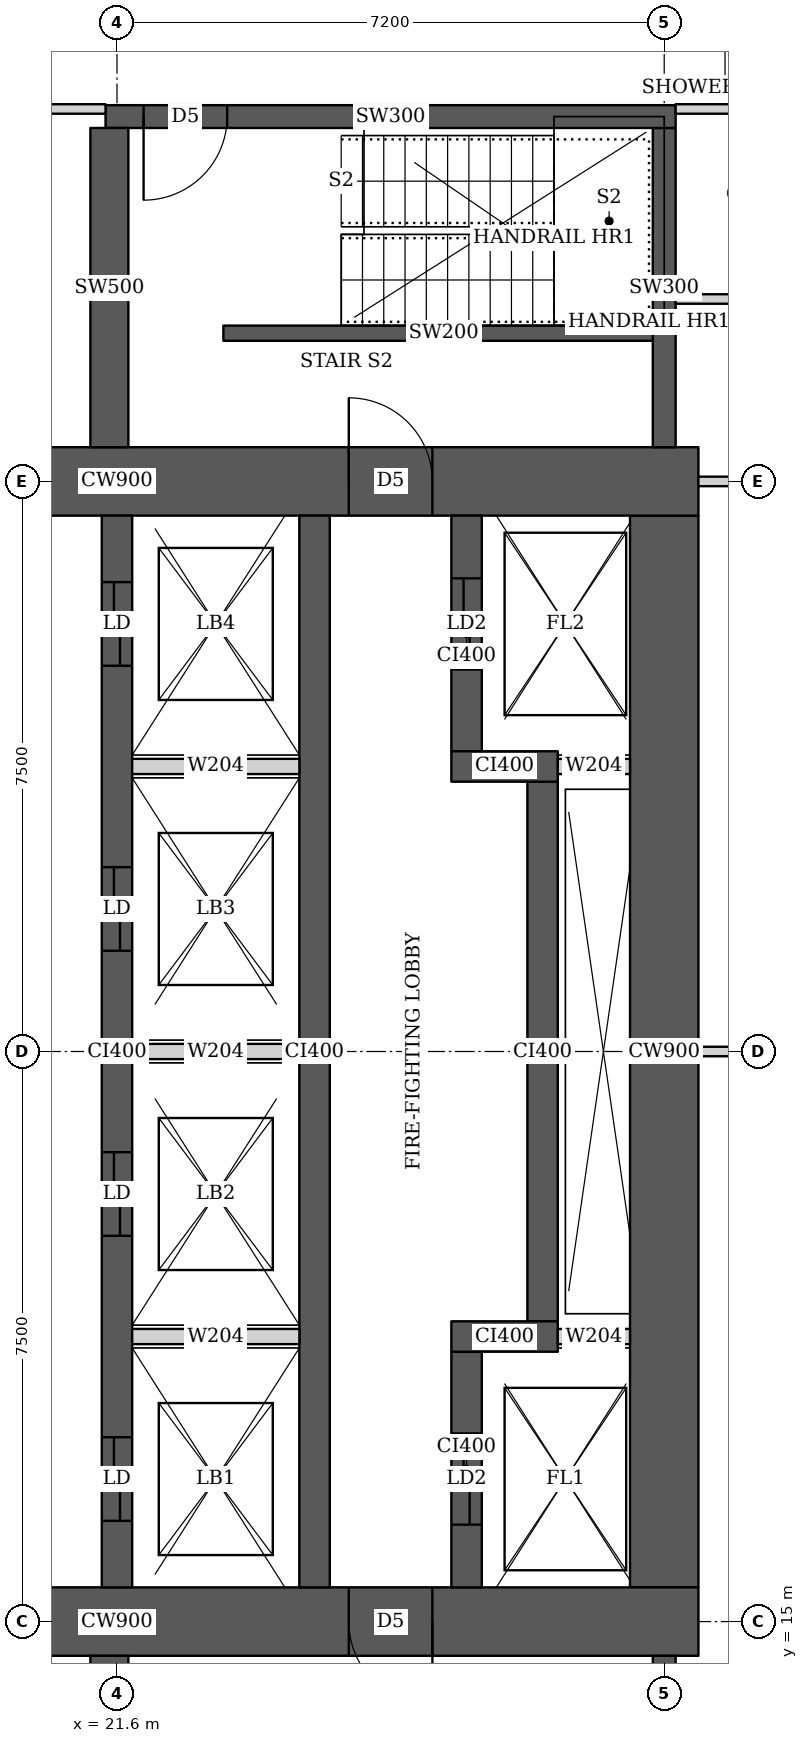
"""IFC4 building model, lengths in metres.
Left out: names, types, materials, properties, quantities, classifications, styles, units other than length and angle.
Written with IfcOpenShell. Run it as: python <this file> out.ifc"""

import sys

from ifc_helpers import new_model, si_unit, direction, frame, frame_2d, origin, place, context, subcontext, project, spatial, rectangle, extrude, element, fill, save


model = new_model("IFC4")
c1 = context("Model", 3, precision=1e-05, world=origin(), true_north=direction((0.0, 1.0)))
c2 = subcontext(c1, "Body", "Model", "MODEL_VIEW")
j1 = project(units=[si_unit("LENGTHUNIT", "METRE"), si_unit("PLANEANGLEUNIT", "RADIAN")], contexts=[c1])
p1 = place(None, origin())
s1 = spatial("IfcSite", under=j1, at=p1, CompositionType="ELEMENT")
p2 = place(p1, origin())
s2 = spatial("IfcBuilding", under=s1, at=p2, CompositionType="ELEMENT")
p3 = place(p2, frame((0.0, 0.0, 234.95)))
s3 = spatial("IfcBuildingStorey", under=s2, at=p3, CompositionType="ELEMENT", Elevation=234.95)
p4 = place(p3, frame((13.95, 15.0, 0.0), z_axis=(0.0, 0.0, 1.0), x_axis=(1.0, 0.0, 0.0)))
e1 = element("IfcWall", 1, at=p4, inside=s3, PredefinedType="SHEAR", context=c2, shape_type="SweptSolid", body=[
    extrude(rectangle(XDim=15.3, YDim=0.9, at=frame_2d((7.65, 0.0))), origin(), (0.0, 0.0, 1.0), 3.75),
])
p5 = place(p4, frame((4.45, 0.0, 0.0)))
e2 = element("IfcOpeningElement", 2, at=p5, cuts=e1, PredefinedType="OPENING", context=c2, shape_type="SweptSolid", body=[
    extrude(rectangle(XDim=1.8, YDim=2.1, at=frame_2d((0.9, 1.05))), frame((0.0, 0.46, 0.0), z_axis=(0.0, -1.0, 0.0), x_axis=(1.0, 0.0, 0.0)), (0.0, 0.0, 1.0), 0.92),
])
p6 = place(p4, frame((10.7, 0.0, 0.0)))
e3 = element("IfcOpeningElement", 3, at=p6, cuts=e1, PredefinedType="OPENING", context=c2, shape_type="SweptSolid", body=[
    extrude(rectangle(XDim=1.1, YDim=2.1, at=frame_2d((0.55, 1.05))), frame((0.0, 0.46, 0.0), z_axis=(0.0, -1.0, 0.0), x_axis=(1.0, 0.0, 0.0)), (0.0, 0.0, 1.0), 0.92),
])
p7 = place(p3, frame((13.95, 30.0, 0.0), z_axis=(0.0, 0.0, 1.0), x_axis=(1.0, 0.0, 0.0)))
e4 = element("IfcWall", 4, at=p7, inside=s3, PredefinedType="SHEAR", context=c2, shape_type="SweptSolid", body=[
    extrude(rectangle(XDim=15.3, YDim=0.9, at=frame_2d((7.65, 0.0))), origin(), (0.0, 0.0, 1.0), 3.75),
])
p8 = place(p7, frame((4.45, 0.0, 0.0)))
e5 = element("IfcOpeningElement", 5, at=p8, cuts=e4, PredefinedType="OPENING", context=c2, shape_type="SweptSolid", body=[
    extrude(rectangle(XDim=1.8, YDim=2.1, at=frame_2d((0.9, 1.05))), frame((0.0, 0.46, 0.0), z_axis=(0.0, -1.0, 0.0), x_axis=(1.0, 0.0, 0.0)), (0.0, 0.0, 1.0), 0.92),
])
p9 = place(p7, frame((10.7, 0.0, 0.0)))
e6 = element("IfcOpeningElement", 6, at=p9, cuts=e4, PredefinedType="OPENING", context=c2, shape_type="SweptSolid", body=[
    extrude(rectangle(XDim=1.1, YDim=2.1, at=frame_2d((0.55, 1.05))), frame((0.0, 0.46, 0.0), z_axis=(0.0, -1.0, 0.0), x_axis=(1.0, 0.0, 0.0)), (0.0, 0.0, 1.0), 0.92),
])
p10 = place(p3, frame((28.8, 15.45, 0.0), z_axis=(0.0, 0.0, 1.0), x_axis=(0.0, 1.0, 0.0)))
e7 = element("IfcWall", 7, at=p10, inside=s3, PredefinedType="SHEAR", context=c2, shape_type="SweptSolid", body=[
    extrude(rectangle(XDim=14.1, YDim=0.9, at=frame_2d((7.05, 0.0))), origin(), (0.0, 0.0, 1.0), 3.75),
])
p11 = place(p3, frame((21.6, 15.45, 0.0), z_axis=(0.0, 0.0, 1.0), x_axis=(0.0, 1.0, 0.0)))
e8 = element("IfcWall", 8, at=p11, inside=s3, PredefinedType="SHEAR", context=c2, shape_type="SweptSolid", body=[
    extrude(rectangle(XDim=14.1, YDim=0.4, at=frame_2d((7.05, 0.0))), origin(), (0.0, 0.0, 1.0), 3.75),
])
p12 = place(p11, frame((0.875, 0.0, 0.0)))
e9 = element("IfcOpeningElement", 9, at=p12, cuts=e8, PredefinedType="OPENING", context=c2, shape_type="SweptSolid", body=[
    extrude(rectangle(XDim=1.1, YDim=2.1, at=frame_2d((0.55, 1.05))), frame((0.0, 0.21, 0.0), z_axis=(0.0, -1.0, 0.0), x_axis=(1.0, 0.0, 0.0)), (0.0, 0.0, 1.0), 0.42),
])
p13 = place(p11, frame((4.625, 0.0, 0.0)))
e10 = element("IfcOpeningElement", 10, at=p13, cuts=e8, PredefinedType="OPENING", context=c2, shape_type="SweptSolid", body=[
    extrude(rectangle(XDim=1.1, YDim=2.1, at=frame_2d((0.55, 1.05))), frame((0.0, 0.21, 0.0), z_axis=(0.0, -1.0, 0.0), x_axis=(1.0, 0.0, 0.0)), (0.0, 0.0, 1.0), 0.42),
])
p14 = place(p11, frame((8.375, 0.0, 0.0)))
e11 = element("IfcOpeningElement", 11, at=p14, cuts=e8, PredefinedType="OPENING", context=c2, shape_type="SweptSolid", body=[
    extrude(rectangle(XDim=1.1, YDim=2.1, at=frame_2d((0.55, 1.05))), frame((0.0, 0.21, 0.0), z_axis=(0.0, -1.0, 0.0), x_axis=(1.0, 0.0, 0.0)), (0.0, 0.0, 1.0), 0.42),
])
p15 = place(p11, frame((12.125, 0.0, 0.0)))
e12 = element("IfcOpeningElement", 12, at=p15, cuts=e8, PredefinedType="OPENING", context=c2, shape_type="SweptSolid", body=[
    extrude(rectangle(XDim=1.1, YDim=2.1, at=frame_2d((0.55, 1.05))), frame((0.0, 0.21, 0.0), z_axis=(0.0, -1.0, 0.0), x_axis=(1.0, 0.0, 0.0)), (0.0, 0.0, 1.0), 0.42),
])
p16 = place(p3, frame((24.2, 15.45, 0.0), z_axis=(0.0, 0.0, 1.0), x_axis=(0.0, 1.0, 0.0)))
e13 = element("IfcWall", 13, at=p16, inside=s3, PredefinedType="SHEAR", context=c2, shape_type="SweptSolid", body=[
    extrude(rectangle(XDim=14.1, YDim=0.4, at=frame_2d((7.05, 0.0))), origin(), (0.0, 0.0, 1.0), 3.75),
])
p17 = place(p3, frame((26.2, 15.45, 0.0), z_axis=(0.0, 0.0, 1.0), x_axis=(0.0, 1.0, 0.0)))
e14 = element("IfcWall", 14, at=p17, inside=s3, PredefinedType="SHEAR", context=c2, shape_type="SweptSolid", body=[
    extrude(rectangle(XDim=3.1, YDim=0.4, at=frame_2d((1.55, 0.0))), origin(), (0.0, 0.0, 1.0), 3.75),
])
p18 = place(p17, frame((0.825, 0.0, 0.0)))
e15 = element("IfcOpeningElement", 15, at=p18, cuts=e14, PredefinedType="OPENING", context=c2, shape_type="SweptSolid", body=[
    extrude(rectangle(XDim=1.2, YDim=2.1, at=frame_2d((0.6, 1.05))), frame((0.0, 0.21, 0.0), z_axis=(0.0, -1.0, 0.0), x_axis=(1.0, 0.0, 0.0)), (0.0, 0.0, 1.0), 0.42),
])
p19 = place(p3, frame((26.0, 18.75, 0.0), z_axis=(0.0, 0.0, 1.0), x_axis=(1.0, 0.0, 0.0)))
e16 = element("IfcWall", 16, at=p19, inside=s3, PredefinedType="SHEAR", context=c2, shape_type="SweptSolid", body=[
    extrude(rectangle(XDim=1.4, YDim=0.4, at=frame_2d((0.7, 0.0))), origin(), (0.0, 0.0, 1.0), 3.75),
])
p20 = place(p3, frame((27.2, 18.95, 0.0), z_axis=(0.0, 0.0, 1.0), x_axis=(0.0, 1.0, 0.0)))
e17 = element("IfcWall", 17, at=p20, inside=s3, PredefinedType="SHEAR", context=c2, shape_type="SweptSolid", body=[
    extrude(rectangle(XDim=7.1, YDim=0.4, at=frame_2d((3.55, 0.0))), origin(), (0.0, 0.0, 1.0), 3.75),
])
p21 = place(p3, frame((26.0, 26.25, 0.0), z_axis=(0.0, 0.0, 1.0), x_axis=(1.0, 0.0, 0.0)))
e18 = element("IfcWall", 18, at=p21, inside=s3, PredefinedType="SHEAR", context=c2, shape_type="SweptSolid", body=[
    extrude(rectangle(XDim=1.4, YDim=0.4, at=frame_2d((0.7, 0.0))), origin(), (0.0, 0.0, 1.0), 3.75),
])
p22 = place(p3, frame((26.2, 26.45, 0.0), z_axis=(0.0, 0.0, 1.0), x_axis=(0.0, 1.0, 0.0)))
e19 = element("IfcWall", 19, at=p22, inside=s3, PredefinedType="SHEAR", context=c2, shape_type="SweptSolid", body=[
    extrude(rectangle(XDim=3.1, YDim=0.4, at=frame_2d((1.55, 0.0))), origin(), (0.0, 0.0, 1.0), 3.75),
])
p23 = place(p22, frame((1.075, 0.0, 0.0)))
e20 = element("IfcOpeningElement", 20, at=p23, cuts=e19, PredefinedType="OPENING", context=c2, shape_type="SweptSolid", body=[
    extrude(rectangle(XDim=1.2, YDim=2.1, at=frame_2d((0.6, 1.05))), frame((0.0, 0.21, 0.0), z_axis=(0.0, -1.0, 0.0), x_axis=(1.0, 0.0, 0.0)), (0.0, 0.0, 1.0), 0.42),
])
p24 = place(p3, frame((21.5, 10.35, 0.0), z_axis=(0.0, 0.0, 1.0), x_axis=(0.0, 1.0, 0.0)))
e21 = element("IfcWall", 21, at=p24, inside=s3, PredefinedType="SHEAR", context=c2, shape_type="SweptSolid", body=[
    extrude(rectangle(XDim=4.2, YDim=0.5, at=frame_2d((2.1, 0.0))), origin(), (0.0, 0.0, 1.0), 3.75),
])
p25 = place(p3, frame((28.8, 10.35, 0.0), z_axis=(0.0, 0.0, 1.0), x_axis=(0.0, 1.0, 0.0)))
e22 = element("IfcWall", 22, at=p25, inside=s3, PredefinedType="SHEAR", context=c2, shape_type="SweptSolid", body=[
    extrude(rectangle(XDim=4.2, YDim=0.3, at=frame_2d((2.1, 0.0))), origin(), (0.0, 0.0, 1.0), 3.75),
])
p26 = place(p3, frame((21.45, 34.8, 0.0), z_axis=(0.0, 0.0, 1.0), x_axis=(1.0, 0.0, 0.0)))
e23 = element("IfcWall", 23, at=p26, inside=s3, PredefinedType="SHEAR", context=c2, shape_type="SweptSolid", body=[
    extrude(rectangle(XDim=7.5, YDim=0.3, at=frame_2d((3.75, 0.0))), origin(), (0.0, 0.0, 1.0), 3.75),
])
p27 = place(p26, frame((0.5, 0.0, 0.0)))
e24 = element("IfcOpeningElement", 24, at=p27, cuts=e23, PredefinedType="OPENING", context=c2, shape_type="SweptSolid", body=[
    extrude(rectangle(XDim=1.1, YDim=2.1, at=frame_2d((0.55, 1.05))), frame((0.0, 0.16, 0.0), z_axis=(0.0, -1.0, 0.0), x_axis=(1.0, 0.0, 0.0)), (0.0, 0.0, 1.0), 0.32),
])
p28 = place(p3, frame((21.5, 30.45, 0.0), z_axis=(0.0, 0.0, 1.0), x_axis=(0.0, 1.0, 0.0)))
e25 = element("IfcWall", 25, at=p28, inside=s3, PredefinedType="SHEAR", context=c2, shape_type="SweptSolid", body=[
    extrude(rectangle(XDim=4.2, YDim=0.5, at=frame_2d((2.1, 0.0))), origin(), (0.0, 0.0, 1.0), 3.75),
])
p29 = place(p3, frame((28.8, 30.45, 0.0), z_axis=(0.0, 0.0, 1.0), x_axis=(0.0, 1.0, 0.0)))
e26 = element("IfcWall", 26, at=p29, inside=s3, PredefinedType="SHEAR", context=c2, shape_type="SweptSolid", body=[
    extrude(rectangle(XDim=4.2, YDim=0.3, at=frame_2d((2.1, 0.0))), origin(), (0.0, 0.0, 1.0), 3.75),
])
p30 = place(p3, frame((13.75, 34.9, 0.0), z_axis=(0.0, 0.0, 1.0), x_axis=(1.0, 0.0, 0.0)))
e27 = element("IfcWall", 27, at=p30, inside=s3, PredefinedType="PARTITIONING", context=c2, shape_type="SweptSolid", body=[
    extrude(rectangle(XDim=7.7, YDim=0.125, at=frame_2d((3.85, 0.0))), origin(), (0.0, 0.0, 1.0), 3.5),
])
p31 = place(p30, frame((4.15, 0.0, 0.0)))
e28 = element("IfcOpeningElement", 28, at=p31, cuts=e27, PredefinedType="OPENING", context=c2, shape_type="SweptSolid", body=[
    extrude(rectangle(XDim=1.8, YDim=2.1, at=frame_2d((0.9, 1.05))), frame((0.0, 0.073, 0.0), z_axis=(0.0, -1.0, 0.0), x_axis=(1.0, 0.0, 0.0)), (0.0, 0.0, 1.0), 0.145),
])
p32 = place(p3, frame((28.95, 34.9, 0.0), z_axis=(0.0, 0.0, 1.0), x_axis=(1.0, 0.0, 0.0)))
e29 = element("IfcWall", 29, at=p32, inside=s3, PredefinedType="PARTITIONING", context=c2, shape_type="SweptSolid", body=[
    extrude(rectangle(XDim=4.588, YDim=0.125, at=frame_2d((2.294, 0.0))), origin(), (0.0, 0.0, 1.0), 3.5),
])
for number, where, z_axis, x_axis in (
    (30, (29.25, 22.5, 0.0), (0.0, 0.0, 1.0), (1.0, 0.0, 0.0)),
    (31, (29.25, 30.0, 0.0), (0.0, 0.0, 1.0), (1.0, 0.0, 0.0)),
):
    element("IfcWall", number, at=place(p3, frame(where, z_axis=z_axis, x_axis=x_axis)), inside=s3, PredefinedType="PARTITIONING", context=c2, shape_type="SweptSolid", body=[
        extrude(rectangle(XDim=3.049, YDim=0.125, at=frame_2d((1.524, 0.0))), origin(), (0.0, 0.0, 1.0), 3.5),
    ])
p33 = place(p3, frame((28.95, 32.4, 0.0), z_axis=(0.0, 0.0, 1.0), x_axis=(1.0, 0.0, 0.0)))
e32 = element("IfcWall", 32, at=p33, inside=s3, PredefinedType="PARTITIONING", context=c2, shape_type="SweptSolid", body=[
    extrude(rectangle(XDim=4.976, YDim=0.125, at=frame_2d((2.488, 0.0))), origin(), (0.0, 0.0, 1.0), 3.5),
])
p34 = place(p3, frame((23.0, 31.95, 0.0), z_axis=(0.0, 0.0, 1.0), x_axis=(1.0, 0.0, 0.0)))
e33 = element("IfcWall", 33, at=p34, inside=s3, PredefinedType="SHEAR", context=c2, shape_type="SweptSolid", body=[
    extrude(rectangle(XDim=5.8, YDim=0.2, at=frame_2d((2.9, 0.0))), origin(), (0.0, 0.0, 1.0), 3.75),
])
for number, where, z_axis, x_axis in (
    (34, (21.8, 18.75, 0.0), (0.0, 0.0, 1.0), (1.0, 0.0, 0.0)),
    (35, (21.8, 22.5, 0.0), (0.0, 0.0, 1.0), (1.0, 0.0, 0.0)),
    (36, (21.8, 26.25, 0.0), (0.0, 0.0, 1.0), (1.0, 0.0, 0.0)),
):
    element("IfcWall", number, at=place(p3, frame(where, z_axis=z_axis, x_axis=x_axis)), inside=s3, PredefinedType="SOLIDWALL", context=c2, shape_type="SweptSolid", body=[
        extrude(rectangle(XDim=2.2, YDim=0.2, at=frame_2d((1.1, 0.0))), origin(), (0.0, 0.0, 1.0), 3.5),
    ])
for number, where, z_axis, x_axis in (
    (37, (27.4, 18.75, 0.0), (0.0, 0.0, 1.0), (1.0, 0.0, 0.0)),
    (38, (27.4, 26.25, 0.0), (0.0, 0.0, 1.0), (1.0, 0.0, 0.0)),
):
    element("IfcWall", number, at=place(p3, frame(where, z_axis=z_axis, x_axis=x_axis)), inside=s3, PredefinedType="SOLIDWALL", context=c2, shape_type="SweptSolid", body=[
        extrude(rectangle(XDim=0.95, YDim=0.2, at=frame_2d((0.475, 0.0))), origin(), (0.0, 0.0, 1.0), 3.5),
    ])
p35 = place(p6, origin())
e39 = element("IfcDoor", 39, at=p35, inside=s3, OperationType="SINGLE_SWING_LEFT", PredefinedType="DOOR", context=c2, shape_type="SweptSolid", body=[
    extrude(rectangle(XDim=1.1, YDim=2.1, at=frame_2d((0.55, 1.05))), frame((0.0, 0.025, 0.0), z_axis=(0.0, -1.0, 0.0), x_axis=(1.0, 0.0, 0.0)), (0.0, 0.0, 1.0), 0.05),
])
fill(e3, e39)
p36 = place(p9, origin())
e40 = element("IfcDoor", 40, at=p36, inside=s3, OperationType="SINGLE_SWING_LEFT", PredefinedType="DOOR", context=c2, shape_type="SweptSolid", body=[
    extrude(rectangle(XDim=1.1, YDim=2.1, at=frame_2d((0.55, 1.05))), frame((0.0, 0.025, 0.0), z_axis=(0.0, -1.0, 0.0), x_axis=(1.0, 0.0, 0.0)), (0.0, 0.0, 1.0), 0.05),
])
fill(e6, e40)
p37 = place(p18, origin())
e41 = element("IfcDoor", 41, at=p37, inside=s3, OperationType="DOUBLE_DOOR_SLIDING", PredefinedType="DOOR", context=c2, shape_type="SweptSolid", body=[
    extrude(rectangle(XDim=1.2, YDim=2.1, at=frame_2d((0.6, 1.05))), frame((0.0, 0.025, 0.0), z_axis=(0.0, -1.0, 0.0), x_axis=(1.0, 0.0, 0.0)), (0.0, 0.0, 1.0), 0.05),
])
fill(e15, e41)
p38 = place(p23, origin())
e42 = element("IfcDoor", 42, at=p38, inside=s3, OperationType="DOUBLE_DOOR_SLIDING", PredefinedType="DOOR", context=c2, shape_type="SweptSolid", body=[
    extrude(rectangle(XDim=1.2, YDim=2.1, at=frame_2d((0.6, 1.05))), frame((0.0, 0.025, 0.0), z_axis=(0.0, -1.0, 0.0), x_axis=(1.0, 0.0, 0.0)), (0.0, 0.0, 1.0), 0.05),
])
fill(e20, e42)
p39 = place(p12, origin())
e43 = element("IfcDoor", 43, at=p39, inside=s3, OperationType="DOUBLE_DOOR_SLIDING", PredefinedType="DOOR", context=c2, shape_type="SweptSolid", body=[
    extrude(rectangle(XDim=1.1, YDim=2.1, at=frame_2d((0.55, 1.05))), frame((0.0, 0.025, 0.0), z_axis=(0.0, -1.0, 0.0), x_axis=(1.0, 0.0, 0.0)), (0.0, 0.0, 1.0), 0.05),
])
fill(e9, e43)
p40 = place(p13, origin())
e44 = element("IfcDoor", 44, at=p40, inside=s3, OperationType="DOUBLE_DOOR_SLIDING", PredefinedType="DOOR", context=c2, shape_type="SweptSolid", body=[
    extrude(rectangle(XDim=1.1, YDim=2.1, at=frame_2d((0.55, 1.05))), frame((0.0, 0.025, 0.0), z_axis=(0.0, -1.0, 0.0), x_axis=(1.0, 0.0, 0.0)), (0.0, 0.0, 1.0), 0.05),
])
fill(e10, e44)
p41 = place(p14, origin())
e45 = element("IfcDoor", 45, at=p41, inside=s3, OperationType="DOUBLE_DOOR_SLIDING", PredefinedType="DOOR", context=c2, shape_type="SweptSolid", body=[
    extrude(rectangle(XDim=1.1, YDim=2.1, at=frame_2d((0.55, 1.05))), frame((0.0, 0.025, 0.0), z_axis=(0.0, -1.0, 0.0), x_axis=(1.0, 0.0, 0.0)), (0.0, 0.0, 1.0), 0.05),
])
fill(e11, e45)
p42 = place(p15, origin())
e46 = element("IfcDoor", 46, at=p42, inside=s3, OperationType="DOUBLE_DOOR_SLIDING", PredefinedType="DOOR", context=c2, shape_type="SweptSolid", body=[
    extrude(rectangle(XDim=1.1, YDim=2.1, at=frame_2d((0.55, 1.05))), frame((0.0, 0.025, 0.0), z_axis=(0.0, -1.0, 0.0), x_axis=(1.0, 0.0, 0.0)), (0.0, 0.0, 1.0), 0.05),
])
fill(e12, e46)
p43 = place(p27, origin())
e47 = element("IfcDoor", 47, at=p43, inside=s3, OperationType="SINGLE_SWING_RIGHT", PredefinedType="DOOR", context=c2, shape_type="SweptSolid", body=[
    extrude(rectangle(XDim=1.1, YDim=2.1, at=frame_2d((0.55, 1.05))), frame((0.0, 0.025, 0.0), z_axis=(0.0, -1.0, 0.0), x_axis=(1.0, 0.0, 0.0)), (0.0, 0.0, 1.0), 0.05),
])
fill(e24, e47)
save(model, sys.argv[1])
